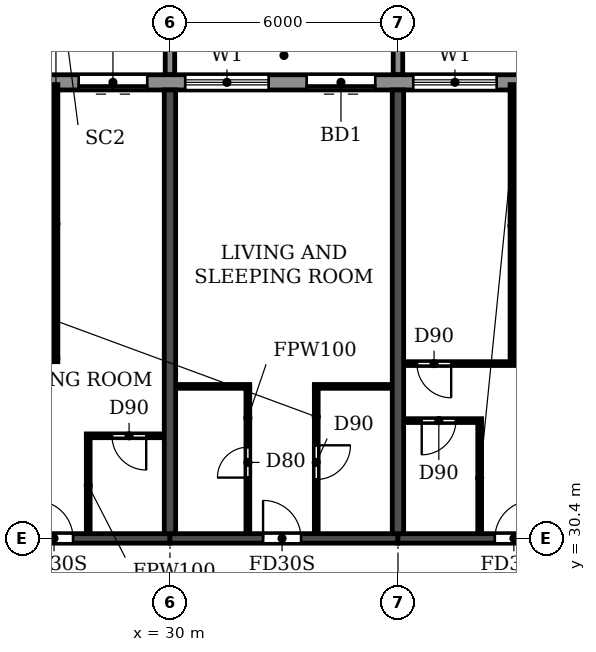
"""IFC4 building model, lengths in metres.
Left out: names, types, materials, properties, quantities, classifications, styles, units other than length and angle.
Written with IfcOpenShell. Run it as: python <this file> out.ifc"""

import sys

from ifc_helpers import new_model, si_unit, direction, frame, frame_2d, origin, place, context, subcontext, project, spatial, polyline, rectangle, outline, extrude, source, transform, mapped, element, fill, save


model = new_model("IFC4")
c1 = context("Model", 3, precision=1e-05, world=origin(), true_north=direction((0.0, 1.0)))
c2 = subcontext(c1, "Body", "Model", "MODEL_VIEW")
j1 = project(units=[si_unit("LENGTHUNIT", "METRE"), si_unit("PLANEANGLEUNIT", "RADIAN")], contexts=[c1])
p1 = place(None, origin())
s1 = spatial("IfcSite", under=j1, at=p1, CompositionType="ELEMENT")
p2 = place(p1, origin())
s2 = spatial("IfcBuilding", under=s1, at=p2, CompositionType="ELEMENT")
p3 = place(p2, frame((0.0, 0.0, 122.4)))
s3 = spatial("IfcBuildingStorey", under=s2, at=p3, CompositionType="ELEMENT", Elevation=122.4)
for number, where, z_axis, x_axis in (
    (1, (30.0, 30.525, 0.0), (0.0, 0.0, 1.0), (0.0, 1.0, 0.0)),
    (2, (36.0, 30.525, 0.0), (0.0, 0.0, 1.0), (0.0, 1.0, 0.0)),
):
    element("IfcWall", number, at=place(p3, frame(where, z_axis=z_axis, x_axis=x_axis)), inside=s3, PredefinedType="SHEAR", context=c2, shape_type="SweptSolid", body=[
        extrude(rectangle(XDim=11.675, YDim=0.3, at=frame_2d((5.837, 0.0))), origin(), (0.0, 0.0, 1.0), 3.07),
    ])
p4 = place(p3, frame((24.0, 30.4, 0.0), z_axis=(0.0, 0.0, 1.0), x_axis=(1.0, 0.0, 0.0)))
e3 = element("IfcWall", 3, at=p4, inside=s3, PredefinedType="SHEAR", context=c2, shape_type="SweptSolid", body=[
    extrude(rectangle(XDim=6.0, YDim=0.25, at=frame_2d((3.0, 0.0))), origin(), (0.0, 0.0, 1.0), 2.47),
])
p5 = place(p4, frame((2.45, 0.0, 0.0)))
e4 = element("IfcOpeningElement", 4, at=p5, cuts=e3, PredefinedType="OPENING", context=c2, shape_type="SweptSolid", body=[
    extrude(rectangle(XDim=1.0, YDim=2.1, at=frame_2d((0.5, 1.05))), frame((0.0, 0.135, 0.0), z_axis=(0.0, -1.0, 0.0), x_axis=(1.0, 0.0, 0.0)), (0.0, 0.0, 1.0), 0.27),
])
p6 = place(p3, frame((30.0, 30.4, 0.0), z_axis=(0.0, 0.0, 1.0), x_axis=(1.0, 0.0, 0.0)))
e5 = element("IfcWall", 5, at=p6, inside=s3, PredefinedType="SHEAR", context=c2, shape_type="SweptSolid", body=[
    extrude(rectangle(XDim=6.0, YDim=0.25, at=frame_2d((3.0, 0.0))), origin(), (0.0, 0.0, 1.0), 2.47),
])
p7 = place(p6, frame((2.45, 0.0, 0.0)))
e6 = element("IfcOpeningElement", 6, at=p7, cuts=e5, PredefinedType="OPENING", context=c2, shape_type="SweptSolid", body=[
    extrude(rectangle(XDim=1.0, YDim=2.1, at=frame_2d((0.5, 1.05))), frame((0.0, 0.135, 0.0), z_axis=(0.0, -1.0, 0.0), x_axis=(1.0, 0.0, 0.0)), (0.0, 0.0, 1.0), 0.27),
])
p8 = place(p3, frame((36.0, 30.4, 0.0), z_axis=(0.0, 0.0, 1.0), x_axis=(1.0, 0.0, 0.0)))
e7 = element("IfcWall", 7, at=p8, inside=s3, PredefinedType="SHEAR", context=c2, shape_type="SweptSolid", body=[
    extrude(rectangle(XDim=6.0, YDim=0.25, at=frame_2d((3.0, 0.0))), origin(), (0.0, 0.0, 1.0), 2.47),
])
p9 = place(p8, frame((2.55, 0.0, 0.0)))
e8 = element("IfcOpeningElement", 8, at=p9, cuts=e7, PredefinedType="OPENING", context=c2, shape_type="SweptSolid", body=[
    extrude(rectangle(XDim=1.0, YDim=2.1, at=frame_2d((0.5, 1.05))), frame((0.0, 0.135, 0.0), z_axis=(0.0, -1.0, 0.0), x_axis=(1.0, 0.0, 0.0)), (0.0, 0.0, 1.0), 0.27),
])
p10 = place(p3, frame((85.317, 42.4, 0.0), z_axis=(0.0, 0.0, 1.0), x_axis=(-1.0, 0.0, 0.0)))
e9 = element("IfcWall", 9, at=p10, inside=s3, PredefinedType="STANDARD", context=c2, shape_type="SweptSolid", body=[
    extrude(rectangle(XDim=68.634, YDim=0.4, at=frame_2d((34.317, 0.0))), origin(), (0.0, 0.0, 1.0), 3.07),
])
p11 = place(p10, frame((64.717, 0.0, 0.9)))
e10 = element("IfcOpeningElement", 10, at=p11, cuts=e9, PredefinedType="OPENING", context=c2, shape_type="SweptSolid", body=[
    extrude(rectangle(XDim=2.2, YDim=1.5, at=frame_2d((1.1, 0.75))), frame((0.0, 0.21, 0.0), z_axis=(0.0, -1.0, 0.0), x_axis=(1.0, 0.0, 0.0)), (0.0, 0.0, 1.0), 0.42),
])
p12 = place(p10, frame((61.917, 0.0, 0.0)))
e11 = element("IfcOpeningElement", 11, at=p12, cuts=e9, PredefinedType="OPENING", context=c2, shape_type="SweptSolid", body=[
    extrude(rectangle(XDim=1.8, YDim=2.4, at=frame_2d((0.9, 1.2))), frame((0.0, 0.21, 0.0), z_axis=(0.0, -1.0, 0.0), x_axis=(1.0, 0.0, 0.0)), (0.0, 0.0, 1.0), 0.42),
])
p13 = place(p10, frame((58.717, 0.0, 0.9)))
e12 = element("IfcOpeningElement", 12, at=p13, cuts=e9, PredefinedType="OPENING", context=c2, shape_type="SweptSolid", body=[
    extrude(rectangle(XDim=2.2, YDim=1.5, at=frame_2d((1.1, 0.75))), frame((0.0, 0.21, 0.0), z_axis=(0.0, -1.0, 0.0), x_axis=(1.0, 0.0, 0.0)), (0.0, 0.0, 1.0), 0.42),
])
p14 = place(p10, frame((55.917, 0.0, 0.0)))
e13 = element("IfcOpeningElement", 13, at=p14, cuts=e9, PredefinedType="OPENING", context=c2, shape_type="SweptSolid", body=[
    extrude(rectangle(XDim=1.8, YDim=2.4, at=frame_2d((0.9, 1.2))), frame((0.0, 0.21, 0.0), z_axis=(0.0, -1.0, 0.0), x_axis=(1.0, 0.0, 0.0)), (0.0, 0.0, 1.0), 0.42),
])
p15 = place(p10, frame((52.717, 0.0, 0.9)))
e14 = element("IfcOpeningElement", 14, at=p15, cuts=e9, PredefinedType="OPENING", context=c2, shape_type="SweptSolid", body=[
    extrude(rectangle(XDim=2.2, YDim=1.5, at=frame_2d((1.1, 0.75))), frame((0.0, 0.21, 0.0), z_axis=(0.0, -1.0, 0.0), x_axis=(1.0, 0.0, 0.0)), (0.0, 0.0, 1.0), 0.42),
])
p16 = place(p10, frame((49.917, 0.0, 0.0)))
e15 = element("IfcOpeningElement", 15, at=p16, cuts=e9, PredefinedType="OPENING", context=c2, shape_type="SweptSolid", body=[
    extrude(rectangle(XDim=1.8, YDim=2.4, at=frame_2d((0.9, 1.2))), frame((0.0, 0.21, 0.0), z_axis=(0.0, -1.0, 0.0), x_axis=(1.0, 0.0, 0.0)), (0.0, 0.0, 1.0), 0.42),
])
p17 = place(p10, frame((46.717, 0.0, 0.9)))
e16 = element("IfcOpeningElement", 16, at=p17, cuts=e9, PredefinedType="OPENING", context=c2, shape_type="SweptSolid", body=[
    extrude(rectangle(XDim=2.2, YDim=1.5, at=frame_2d((1.1, 0.75))), frame((0.0, 0.21, 0.0), z_axis=(0.0, -1.0, 0.0), x_axis=(1.0, 0.0, 0.0)), (0.0, 0.0, 1.0), 0.42),
])
p18 = place(p10, frame((43.917, 0.0, 0.0)))
e17 = element("IfcOpeningElement", 17, at=p18, cuts=e9, PredefinedType="OPENING", context=c2, shape_type="SweptSolid", body=[
    extrude(rectangle(XDim=1.8, YDim=2.4, at=frame_2d((0.9, 1.2))), frame((0.0, 0.21, 0.0), z_axis=(0.0, -1.0, 0.0), x_axis=(1.0, 0.0, 0.0)), (0.0, 0.0, 1.0), 0.42),
])
p19 = place(p10, frame((40.717, 0.0, 0.9)))
e18 = element("IfcOpeningElement", 18, at=p19, cuts=e9, PredefinedType="OPENING", context=c2, shape_type="SweptSolid", body=[
    extrude(rectangle(XDim=2.2, YDim=1.5, at=frame_2d((1.1, 0.75))), frame((0.0, 0.21, 0.0), z_axis=(0.0, -1.0, 0.0), x_axis=(1.0, 0.0, 0.0)), (0.0, 0.0, 1.0), 0.42),
])
p20 = place(p10, frame((37.717, 0.0, 0.9)))
e19 = element("IfcOpeningElement", 19, at=p20, cuts=e9, PredefinedType="OPENING", context=c2, shape_type="SweptSolid", body=[
    extrude(rectangle(XDim=2.2, YDim=1.5, at=frame_2d((1.1, 0.75))), frame((0.0, 0.21, 0.0), z_axis=(0.0, -1.0, 0.0), x_axis=(1.0, 0.0, 0.0)), (0.0, 0.0, 1.0), 0.42),
])
p21 = place(p10, frame((34.917, 0.0, 0.0)))
e20 = element("IfcOpeningElement", 20, at=p21, cuts=e9, PredefinedType="OPENING", context=c2, shape_type="SweptSolid", body=[
    extrude(rectangle(XDim=1.8, YDim=2.4, at=frame_2d((0.9, 1.2))), frame((0.0, 0.21, 0.0), z_axis=(0.0, -1.0, 0.0), x_axis=(1.0, 0.0, 0.0)), (0.0, 0.0, 1.0), 0.42),
])
p22 = place(p10, frame((31.717, 0.0, 0.9)))
e21 = element("IfcOpeningElement", 21, at=p22, cuts=e9, PredefinedType="OPENING", context=c2, shape_type="SweptSolid", body=[
    extrude(rectangle(XDim=2.2, YDim=1.5, at=frame_2d((1.1, 0.75))), frame((0.0, 0.21, 0.0), z_axis=(0.0, -1.0, 0.0), x_axis=(1.0, 0.0, 0.0)), (0.0, 0.0, 1.0), 0.42),
])
p23 = place(p10, frame((28.717, 0.0, 0.9)))
e22 = element("IfcOpeningElement", 22, at=p23, cuts=e9, PredefinedType="OPENING", context=c2, shape_type="SweptSolid", body=[
    extrude(rectangle(XDim=2.2, YDim=1.5, at=frame_2d((1.1, 0.75))), frame((0.0, 0.21, 0.0), z_axis=(0.0, -1.0, 0.0), x_axis=(1.0, 0.0, 0.0)), (0.0, 0.0, 1.0), 0.42),
])
p24 = place(p10, frame((25.717, 0.0, 0.9)))
e23 = element("IfcOpeningElement", 23, at=p24, cuts=e9, PredefinedType="OPENING", context=c2, shape_type="SweptSolid", body=[
    extrude(rectangle(XDim=2.2, YDim=1.5, at=frame_2d((1.1, 0.75))), frame((0.0, 0.21, 0.0), z_axis=(0.0, -1.0, 0.0), x_axis=(1.0, 0.0, 0.0)), (0.0, 0.0, 1.0), 0.42),
])
p25 = place(p10, frame((22.717, 0.0, 0.9)))
e24 = element("IfcOpeningElement", 24, at=p25, cuts=e9, PredefinedType="OPENING", context=c2, shape_type="SweptSolid", body=[
    extrude(rectangle(XDim=2.2, YDim=1.5, at=frame_2d((1.1, 0.75))), frame((0.0, 0.21, 0.0), z_axis=(0.0, -1.0, 0.0), x_axis=(1.0, 0.0, 0.0)), (0.0, 0.0, 1.0), 0.42),
])
p26 = place(p10, frame((19.917, 0.0, 0.0)))
e25 = element("IfcOpeningElement", 25, at=p26, cuts=e9, PredefinedType="OPENING", context=c2, shape_type="SweptSolid", body=[
    extrude(rectangle(XDim=1.8, YDim=2.4, at=frame_2d((0.9, 1.2))), frame((0.0, 0.21, 0.0), z_axis=(0.0, -1.0, 0.0), x_axis=(1.0, 0.0, 0.0)), (0.0, 0.0, 1.0), 0.42),
])
p27 = place(p10, frame((16.917, 0.0, 0.0)))
e26 = element("IfcOpeningElement", 26, at=p27, cuts=e9, PredefinedType="OPENING", context=c2, shape_type="SweptSolid", body=[
    extrude(rectangle(XDim=1.8, YDim=2.4, at=frame_2d((0.9, 1.2))), frame((0.0, 0.21, 0.0), z_axis=(0.0, -1.0, 0.0), x_axis=(1.0, 0.0, 0.0)), (0.0, 0.0, 1.0), 0.42),
])
p28 = place(p10, frame((13.717, 0.0, 0.9)))
e27 = element("IfcOpeningElement", 27, at=p28, cuts=e9, PredefinedType="OPENING", context=c2, shape_type="SweptSolid", body=[
    extrude(rectangle(XDim=2.2, YDim=1.5, at=frame_2d((1.1, 0.75))), frame((0.0, 0.21, 0.0), z_axis=(0.0, -1.0, 0.0), x_axis=(1.0, 0.0, 0.0)), (0.0, 0.0, 1.0), 0.42),
])
p29 = place(p10, frame((10.717, 0.0, 0.9)))
e28 = element("IfcOpeningElement", 28, at=p29, cuts=e9, PredefinedType="OPENING", context=c2, shape_type="SweptSolid", body=[
    extrude(rectangle(XDim=2.2, YDim=1.5, at=frame_2d((1.1, 0.75))), frame((0.0, 0.21, 0.0), z_axis=(0.0, -1.0, 0.0), x_axis=(1.0, 0.0, 0.0)), (0.0, 0.0, 1.0), 0.42),
])
p30 = place(p10, frame((7.717, 0.0, 0.9)))
e29 = element("IfcOpeningElement", 29, at=p30, cuts=e9, PredefinedType="OPENING", context=c2, shape_type="SweptSolid", body=[
    extrude(rectangle(XDim=2.2, YDim=1.5, at=frame_2d((1.1, 0.75))), frame((0.0, 0.21, 0.0), z_axis=(0.0, -1.0, 0.0), x_axis=(1.0, 0.0, 0.0)), (0.0, 0.0, 1.0), 0.42),
])
p31 = place(p10, frame((4.917, 0.0, 0.0)))
e30 = element("IfcOpeningElement", 30, at=p31, cuts=e9, PredefinedType="OPENING", context=c2, shape_type="SweptSolid", body=[
    extrude(rectangle(XDim=1.8, YDim=2.4, at=frame_2d((0.9, 1.2))), frame((0.0, 0.21, 0.0), z_axis=(0.0, -1.0, 0.0), x_axis=(1.0, 0.0, 0.0)), (0.0, 0.0, 1.0), 0.42),
])
p32 = place(p10, frame((1.717, 0.0, 0.9)))
e31 = element("IfcOpeningElement", 31, at=p32, cuts=e9, PredefinedType="OPENING", context=c2, shape_type="SweptSolid", body=[
    extrude(rectangle(XDim=2.2, YDim=1.5, at=frame_2d((1.1, 0.75))), frame((0.0, 0.21, 0.0), z_axis=(0.0, -1.0, 0.0), x_axis=(1.0, 0.0, 0.0)), (0.0, 0.0, 1.0), 0.42),
])
m1 = source(origin(), c2, "Body", "SweptSolid", [
    extrude(outline(polyline([(0.0, 0.0), (0.25, 0.0), (0.25, 3.1), (0.0, 3.1), (0.0, 0.0)])), origin(), (0.0, 0.0, 1.0), 3.1),
])
for number, where in (
    (32, (29.875, 42.6, 0.0)),
    (33, (35.875, 42.6, 0.0)),
):
    element("IfcWall", number, at=place(p3, frame(where)), inside=s3, PredefinedType="STANDARD", context=c2, shape_type="MappedRepresentation", body=[
        mapped(m1, transform((0.0, 0.0, 0.0))),
    ])
p33 = place(p3, frame((27.8, 33.1, 0.0), z_axis=(0.0, 0.0, 1.0), x_axis=(1.0, 0.0, 0.0)))
e34 = element("IfcWall", 34, at=p33, inside=s3, PredefinedType="PARTITIONING", context=c2, shape_type="SweptSolid", body=[
    extrude(rectangle(XDim=2.04, YDim=0.1, at=frame_2d((1.02, 0.0))), origin(), (0.0, 0.0, 1.0), 3.07),
])
p34 = place(p33, frame((0.675, 0.0, 0.0)))
e35 = element("IfcOpeningElement", 35, at=p34, cuts=e34, PredefinedType="OPENING", context=c2, shape_type="SweptSolid", body=[
    extrude(rectangle(XDim=0.9, YDim=2.1, at=frame_2d((0.45, 1.05))), frame((0.0, 0.06, 0.0), z_axis=(0.0, -1.0, 0.0), x_axis=(1.0, 0.0, 0.0)), (0.0, 0.0, 1.0), 0.12),
])
p35 = place(p3, frame((36.16, 33.5, 0.0), z_axis=(0.0, 0.0, 1.0), x_axis=(1.0, 0.0, 0.0)))
e36 = element("IfcWall", 36, at=p35, inside=s3, PredefinedType="PARTITIONING", context=c2, shape_type="SweptSolid", body=[
    extrude(rectangle(XDim=2.04, YDim=0.1, at=frame_2d((1.02, 0.0))), origin(), (0.0, 0.0, 1.0), 3.07),
])
p36 = place(p35, frame((0.465, 0.0, 0.0)))
e37 = element("IfcOpeningElement", 37, at=p36, cuts=e36, PredefinedType="OPENING", context=c2, shape_type="SweptSolid", body=[
    extrude(rectangle(XDim=0.9, YDim=2.1, at=frame_2d((0.45, 1.05))), frame((0.0, 0.06, 0.0), z_axis=(0.0, -1.0, 0.0), x_axis=(1.0, 0.0, 0.0)), (0.0, 0.0, 1.0), 0.12),
])
p37 = place(p3, frame((30.16, 34.4, 0.0), z_axis=(0.0, 0.0, 1.0), x_axis=(1.0, 0.0, 0.0)))
e38 = element("IfcWall", 38, at=p37, inside=s3, PredefinedType="PARTITIONING", context=c2, shape_type="SweptSolid", body=[
    extrude(rectangle(XDim=1.94, YDim=0.1, at=frame_2d((0.97, 0.0))), origin(), (0.0, 0.0, 1.0), 3.07),
])
p38 = place(p3, frame((33.8, 34.4, 0.0), z_axis=(0.0, 0.0, 1.0), x_axis=(1.0, 0.0, 0.0)))
e39 = element("IfcWall", 39, at=p38, inside=s3, PredefinedType="PARTITIONING", context=c2, shape_type="SweptSolid", body=[
    extrude(rectangle(XDim=2.04, YDim=0.1, at=frame_2d((1.02, 0.0))), origin(), (0.0, 0.0, 1.0), 3.07),
])
p39 = place(p3, frame((36.16, 35.0, 0.0), z_axis=(0.0, 0.0, 1.0), x_axis=(1.0, 0.0, 0.0)))
e40 = element("IfcWall", 40, at=p39, inside=s3, PredefinedType="PARTITIONING", context=c2, shape_type="SweptSolid", body=[
    extrude(rectangle(XDim=2.89, YDim=0.1, at=frame_2d((1.445, 0.0))), origin(), (0.0, 0.0, 1.0), 3.07),
])
p40 = place(p39, frame((0.34, 0.0, 0.0)))
e41 = element("IfcOpeningElement", 41, at=p40, cuts=e40, PredefinedType="OPENING", context=c2, shape_type="SweptSolid", body=[
    extrude(rectangle(XDim=0.9, YDim=2.1, at=frame_2d((0.45, 1.05))), frame((0.0, 0.06, 0.0), z_axis=(0.0, -1.0, 0.0), x_axis=(1.0, 0.0, 0.0)), (0.0, 0.0, 1.0), 0.12),
])
p41 = place(p3, frame((24.16, 35.1, 0.0), z_axis=(0.0, 0.0, 1.0), x_axis=(1.0, 0.0, 0.0)))
e42 = element("IfcWall", 42, at=p41, inside=s3, PredefinedType="PARTITIONING", context=c2, shape_type="SweptSolid", body=[
    extrude(rectangle(XDim=2.89, YDim=0.1, at=frame_2d((1.445, 0.0))), origin(), (0.0, 0.0, 1.0), 3.07),
])
p42 = place(p41, frame((0.34, 0.0, 0.0)))
e43 = element("IfcOpeningElement", 43, at=p42, cuts=e42, PredefinedType="OPENING", context=c2, shape_type="SweptSolid", body=[
    extrude(rectangle(XDim=0.9, YDim=2.1, at=frame_2d((0.45, 1.05))), frame((0.0, 0.06, 0.0), z_axis=(0.0, -1.0, 0.0), x_axis=(1.0, 0.0, 0.0)), (0.0, 0.0, 1.0), 0.12),
])
p43 = place(p3, frame((27.0, 35.15, 0.0), z_axis=(0.0, 0.0, 1.0), x_axis=(0.0, 1.0, 0.0)))
e44 = element("IfcWall", 44, at=p43, inside=s3, PredefinedType="PARTITIONING", context=c2, shape_type="SweptSolid", body=[
    extrude(rectangle(XDim=7.19, YDim=0.1, at=frame_2d((3.595, 0.0))), origin(), (0.0, 0.0, 1.0), 3.07),
])
p44 = place(p3, frame((27.85, 30.535, 0.0), z_axis=(0.0, 0.0, 1.0), x_axis=(0.0, 1.0, 0.0)))
e45 = element("IfcWall", 45, at=p44, inside=s3, PredefinedType="PARTITIONING", context=c2, shape_type="SweptSolid", body=[
    extrude(rectangle(XDim=2.515, YDim=0.1, at=frame_2d((1.258, 0.0))), origin(), (0.0, 0.0, 1.0), 3.07),
])
p45 = place(p3, frame((32.05, 30.535, 0.0), z_axis=(0.0, 0.0, 1.0), x_axis=(0.0, 1.0, 0.0)))
e46 = element("IfcWall", 46, at=p45, inside=s3, PredefinedType="PARTITIONING", context=c2, shape_type="SweptSolid", body=[
    extrude(rectangle(XDim=3.815, YDim=0.1, at=frame_2d((1.908, 0.0))), origin(), (0.0, 0.0, 1.0), 3.07),
])
p46 = place(p45, frame((1.465, 0.0, 0.0)))
e47 = element("IfcOpeningElement", 47, at=p46, cuts=e46, PredefinedType="OPENING", context=c2, shape_type="SweptSolid", body=[
    extrude(rectangle(XDim=0.8, YDim=2.1, at=frame_2d((0.4, 1.05))), frame((0.0, 0.06, 0.0), z_axis=(0.0, -1.0, 0.0), x_axis=(1.0, 0.0, 0.0)), (0.0, 0.0, 1.0), 0.12),
])
p47 = place(p3, frame((33.85, 30.535, 0.0), z_axis=(0.0, 0.0, 1.0), x_axis=(0.0, 1.0, 0.0)))
e48 = element("IfcWall", 48, at=p47, inside=s3, PredefinedType="PARTITIONING", context=c2, shape_type="SweptSolid", body=[
    extrude(rectangle(XDim=3.815, YDim=0.1, at=frame_2d((1.908, 0.0))), origin(), (0.0, 0.0, 1.0), 3.07),
])
p48 = place(p47, frame((1.415, 0.0, 0.0)))
e49 = element("IfcOpeningElement", 49, at=p48, cuts=e48, PredefinedType="OPENING", context=c2, shape_type="SweptSolid", body=[
    extrude(rectangle(XDim=0.9, YDim=2.1, at=frame_2d((0.45, 1.05))), frame((0.0, 0.06, 0.0), z_axis=(0.0, -1.0, 0.0), x_axis=(1.0, 0.0, 0.0)), (0.0, 0.0, 1.0), 0.12),
])
p49 = place(p3, frame((38.15, 30.535, 0.0), z_axis=(0.0, 0.0, 1.0), x_axis=(0.0, 1.0, 0.0)))
e50 = element("IfcWall", 50, at=p49, inside=s3, PredefinedType="PARTITIONING", context=c2, shape_type="SweptSolid", body=[
    extrude(rectangle(XDim=2.915, YDim=0.1, at=frame_2d((1.458, 0.0))), origin(), (0.0, 0.0, 1.0), 3.07),
])
p50 = place(p3, frame((39.0, 35.05, 0.0), z_axis=(0.0, 0.0, 1.0), x_axis=(0.0, 1.0, 0.0)))
e51 = element("IfcWall", 51, at=p50, inside=s3, PredefinedType="PARTITIONING", context=c2, shape_type="SweptSolid", body=[
    extrude(rectangle(XDim=7.29, YDim=0.1, at=frame_2d((3.645, 0.0))), origin(), (0.0, 0.0, 1.0), 3.07),
])
p51 = place(p14, origin())
e52 = element("IfcDoor", 52, at=p51, inside=s3, OperationType="DOUBLE_DOOR_SLIDING", PredefinedType="DOOR", context=c2, shape_type="SweptSolid", body=[
    extrude(rectangle(XDim=1.8, YDim=2.4, at=frame_2d((0.9, 1.2))), frame((0.0, 0.025, 0.0), z_axis=(0.0, -1.0, 0.0), x_axis=(1.0, 0.0, 0.0)), (0.0, 0.0, 1.0), 0.05),
])
fill(e13, e52)
p52 = place(p15, origin())
e53 = element("IfcWindow", 53, at=p52, inside=s3, PartitioningType="DOUBLE_PANEL_HORIZONTAL", PredefinedType="WINDOW", context=c2, shape_type="SweptSolid", body=[
    extrude(rectangle(XDim=2.2, YDim=1.5, at=frame_2d((1.1, 0.75))), frame((0.0, 0.03, 0.0), z_axis=(0.0, -1.0, 0.0), x_axis=(1.0, 0.0, 0.0)), (0.0, 0.0, 1.0), 0.06),
])
fill(e14, e53)
p53 = place(p16, origin())
e54 = element("IfcDoor", 54, at=p53, inside=s3, OperationType="DOUBLE_DOOR_SLIDING", PredefinedType="DOOR", context=c2, shape_type="SweptSolid", body=[
    extrude(rectangle(XDim=1.8, YDim=2.4, at=frame_2d((0.9, 1.2))), frame((0.0, 0.025, 0.0), z_axis=(0.0, -1.0, 0.0), x_axis=(1.0, 0.0, 0.0)), (0.0, 0.0, 1.0), 0.05),
])
fill(e15, e54)
p54 = place(p17, origin())
e55 = element("IfcWindow", 55, at=p54, inside=s3, PartitioningType="DOUBLE_PANEL_HORIZONTAL", PredefinedType="WINDOW", context=c2, shape_type="SweptSolid", body=[
    extrude(rectangle(XDim=2.2, YDim=1.5, at=frame_2d((1.1, 0.75))), frame((0.0, 0.03, 0.0), z_axis=(0.0, -1.0, 0.0), x_axis=(1.0, 0.0, 0.0)), (0.0, 0.0, 1.0), 0.06),
])
fill(e16, e55)
p55 = place(p5, origin())
e56 = element("IfcDoor", 56, at=p55, inside=s3, OperationType="SINGLE_SWING_LEFT", PredefinedType="DOOR", context=c2, shape_type="SweptSolid", body=[
    extrude(rectangle(XDim=1.0, YDim=2.1, at=frame_2d((0.5, 1.05))), frame((0.0, 0.025, 0.0), z_axis=(0.0, -1.0, 0.0), x_axis=(1.0, 0.0, 0.0)), (0.0, 0.0, 1.0), 0.05),
])
fill(e4, e56)
p56 = place(p34, frame((0.9, 0.0, 0.0), z_axis=(0.0, 0.0, 1.0), x_axis=(-1.0, 0.0, 0.0)))
e57 = element("IfcDoor", 57, at=p56, inside=s3, OperationType="SINGLE_SWING_LEFT", PredefinedType="DOOR", context=c2, shape_type="SweptSolid", body=[
    extrude(rectangle(XDim=0.9, YDim=2.1, at=frame_2d((0.45, 1.05))), frame((0.0, 0.025, 0.0), z_axis=(0.0, -1.0, 0.0), x_axis=(1.0, 0.0, 0.0)), (0.0, 0.0, 1.0), 0.05),
])
fill(e35, e57)
p57 = place(p46, origin())
e58 = element("IfcDoor", 58, at=p57, inside=s3, OperationType="SINGLE_SWING_LEFT", PredefinedType="DOOR", context=c2, shape_type="SweptSolid", body=[
    extrude(rectangle(XDim=0.8, YDim=2.1, at=frame_2d((0.4, 1.05))), frame((0.0, 0.025, 0.0), z_axis=(0.0, -1.0, 0.0), x_axis=(1.0, 0.0, 0.0)), (0.0, 0.0, 1.0), 0.05),
])
fill(e47, e58)
p58 = place(p7, origin())
e59 = element("IfcDoor", 59, at=p58, inside=s3, OperationType="SINGLE_SWING_LEFT", PredefinedType="DOOR", context=c2, shape_type="SweptSolid", body=[
    extrude(rectangle(XDim=1.0, YDim=2.1, at=frame_2d((0.5, 1.05))), frame((0.0, 0.025, 0.0), z_axis=(0.0, -1.0, 0.0), x_axis=(1.0, 0.0, 0.0)), (0.0, 0.0, 1.0), 0.05),
])
fill(e6, e59)
p59 = place(p48, frame((0.9, 0.0, 0.0), z_axis=(0.0, 0.0, 1.0), x_axis=(-1.0, 0.0, 0.0)))
e60 = element("IfcDoor", 60, at=p59, inside=s3, OperationType="SINGLE_SWING_LEFT", PredefinedType="DOOR", context=c2, shape_type="SweptSolid", body=[
    extrude(rectangle(XDim=0.9, YDim=2.1, at=frame_2d((0.45, 1.05))), frame((0.0, 0.025, 0.0), z_axis=(0.0, -1.0, 0.0), x_axis=(1.0, 0.0, 0.0)), (0.0, 0.0, 1.0), 0.05),
])
fill(e49, e60)
p60 = place(p40, frame((0.9, 0.0, 0.0), z_axis=(0.0, 0.0, 1.0), x_axis=(-1.0, 0.0, 0.0)))
e61 = element("IfcDoor", 61, at=p60, inside=s3, OperationType="SINGLE_SWING_LEFT", PredefinedType="DOOR", context=c2, shape_type="SweptSolid", body=[
    extrude(rectangle(XDim=0.9, YDim=2.1, at=frame_2d((0.45, 1.05))), frame((0.0, 0.025, 0.0), z_axis=(0.0, -1.0, 0.0), x_axis=(1.0, 0.0, 0.0)), (0.0, 0.0, 1.0), 0.05),
])
fill(e41, e61)
p61 = place(p36, frame((0.9, 0.0, 0.0), z_axis=(0.0, 0.0, 1.0), x_axis=(-1.0, 0.0, 0.0)))
e62 = element("IfcDoor", 62, at=p61, inside=s3, OperationType="SINGLE_SWING_RIGHT", PredefinedType="DOOR", context=c2, shape_type="SweptSolid", body=[
    extrude(rectangle(XDim=0.9, YDim=2.1, at=frame_2d((0.45, 1.05))), frame((0.0, 0.025, 0.0), z_axis=(0.0, -1.0, 0.0), x_axis=(1.0, 0.0, 0.0)), (0.0, 0.0, 1.0), 0.05),
])
fill(e37, e62)
p62 = place(p9, origin())
e63 = element("IfcDoor", 63, at=p62, inside=s3, OperationType="SINGLE_SWING_RIGHT", PredefinedType="DOOR", context=c2, shape_type="SweptSolid", body=[
    extrude(rectangle(XDim=1.0, YDim=2.1, at=frame_2d((0.5, 1.05))), frame((0.0, 0.025, 0.0), z_axis=(0.0, -1.0, 0.0), x_axis=(1.0, 0.0, 0.0)), (0.0, 0.0, 1.0), 0.05),
])
fill(e8, e63)
save(model, sys.argv[1])
